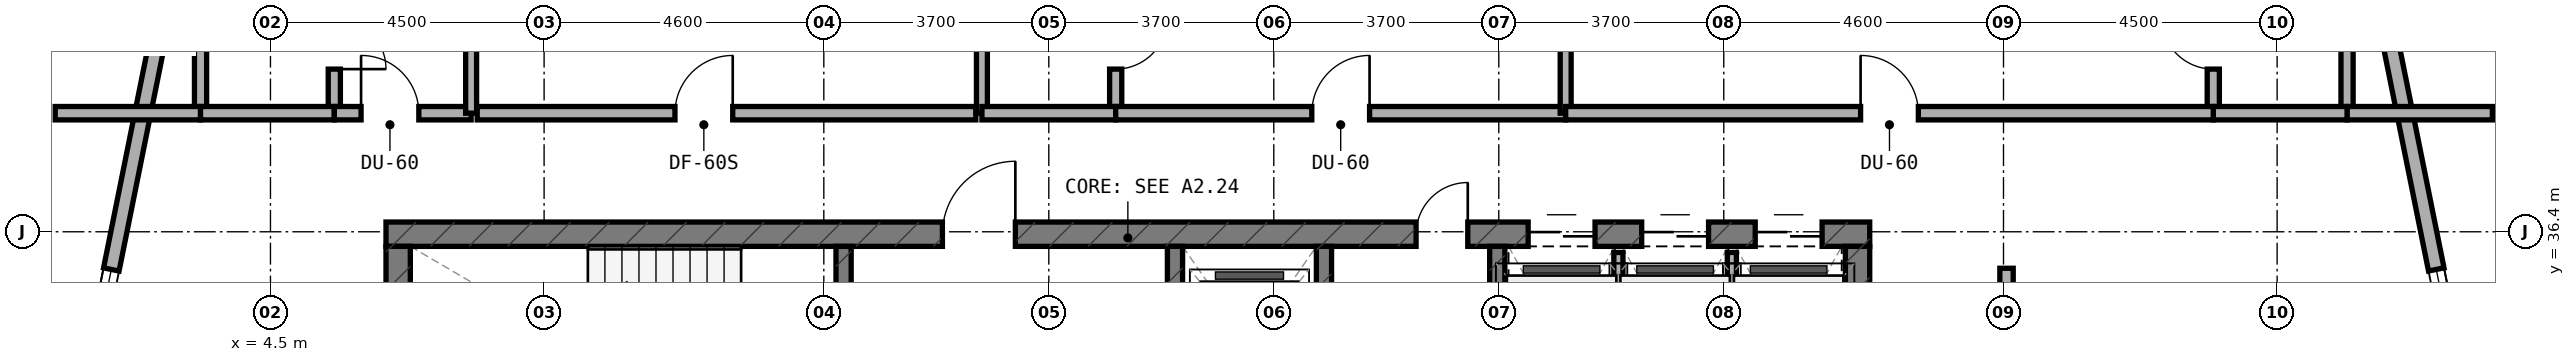
"""IFC4 building model, lengths in metres.
Left out: names, types, materials, properties, quantities, classifications, styles, units other than length and angle.
Written with IfcOpenShell. Run it as: python <this file> out.ifc"""

import sys

from ifc_helpers import new_model, si_unit, direction, frame, frame_2d, origin, place, context, subcontext, project, spatial, rectangle, extrude, element, fill, save


model = new_model("IFC4")
c1 = context("Model", 3, precision=1e-05, world=origin(), true_north=direction((0.0, 1.0)))
c2 = subcontext(c1, "Body", "Model", "MODEL_VIEW")
j1 = project(units=[si_unit("LENGTHUNIT", "METRE"), si_unit("PLANEANGLEUNIT", "RADIAN")], contexts=[c1])
p1 = place(None, origin())
s1 = spatial("IfcSite", under=j1, at=p1, CompositionType="ELEMENT")
p2 = place(p1, origin())
s2 = spatial("IfcBuilding", under=s1, at=p2, CompositionType="ELEMENT")
p3 = place(p2, frame((0.0, 0.0, 109.0)))
s3 = spatial("IfcBuildingStorey", under=s2, at=p3, CompositionType="ELEMENT", Elevation=109.0)
p4 = place(p3, frame((6.4, 36.36, 0.0), z_axis=(0.0, 0.0, 1.0), x_axis=(1.0, 0.0, 0.0)))
e1 = element("IfcWall", 1, at=p4, inside=s3, PredefinedType="SHEAR", context=c2, shape_type="SweptSolid", body=[
    extrude(rectangle(XDim=24.4, YDim=0.4, at=frame_2d((12.2, 0.0))), origin(), (0.0, 0.0, 1.0), 3.5),
])
p5 = place(p4, frame((9.15, 0.0, 0.0)))
e2 = element("IfcOpeningElement", 2, at=p5, cuts=e1, PredefinedType="OPENING", context=c2, shape_type="SweptSolid", body=[
    extrude(rectangle(XDim=1.2, YDim=2.15, at=frame_2d((0.6, 1.075))), frame((0.0, 0.21, 0.0), z_axis=(0.0, -1.0, 0.0), x_axis=(1.0, 0.0, 0.0)), (0.0, 0.0, 1.0), 0.42),
])
p6 = place(p4, frame((16.94, 0.0, 0.0)))
e3 = element("IfcOpeningElement", 3, at=p6, cuts=e1, PredefinedType="OPENING", context=c2, shape_type="SweptSolid", body=[
    extrude(rectangle(XDim=0.85, YDim=2.1, at=frame_2d((0.425, 1.05))), frame((0.0, 0.21, 0.0), z_axis=(0.0, -1.0, 0.0), x_axis=(1.0, 0.0, 0.0)), (0.0, 0.0, 1.0), 0.42),
])
p7 = place(p4, frame((18.783, 0.0, 0.0)))
e4 = element("IfcOpeningElement", 4, at=p7, cuts=e1, PredefinedType="OPENING", context=c2, shape_type="SweptSolid", body=[
    extrude(rectangle(XDim=1.1, YDim=2.15, at=frame_2d((0.55, 1.075))), frame((0.0, 0.21, 0.0), z_axis=(0.0, -1.0, 0.0), x_axis=(1.0, 0.0, 0.0)), (0.0, 0.0, 1.0), 0.42),
])
p8 = place(p4, frame((20.65, 0.0, 0.0)))
e5 = element("IfcOpeningElement", 5, at=p8, cuts=e1, PredefinedType="OPENING", context=c2, shape_type="SweptSolid", body=[
    extrude(rectangle(XDim=1.1, YDim=2.15, at=frame_2d((0.55, 1.075))), frame((0.0, 0.21, 0.0), z_axis=(0.0, -1.0, 0.0), x_axis=(1.0, 0.0, 0.0)), (0.0, 0.0, 1.0), 0.42),
])
p9 = place(p4, frame((22.517, 0.0, 0.0)))
e6 = element("IfcOpeningElement", 6, at=p9, cuts=e1, PredefinedType="OPENING", context=c2, shape_type="SweptSolid", body=[
    extrude(rectangle(XDim=1.1, YDim=2.15, at=frame_2d((0.55, 1.075))), frame((0.0, 0.21, 0.0), z_axis=(0.0, -1.0, 0.0), x_axis=(1.0, 0.0, 0.0)), (0.0, 0.0, 1.0), 0.42),
])
for number, where, z_axis, x_axis in (
    (7, (6.6, 33.0, 0.0), (0.0, 0.0, 1.0), (0.0, 1.0, 0.0)),
    (8, (30.6, 33.0, 0.0), (0.0, 0.0, 1.0), (0.0, 1.0, 0.0)),
):
    element("IfcWall", number, at=place(p3, frame(where, z_axis=z_axis, x_axis=x_axis)), inside=s3, PredefinedType="SHEAR", context=c2, shape_type="SweptSolid", body=[
        extrude(rectangle(XDim=3.16, YDim=0.4, at=frame_2d((1.58, 0.0))), origin(), (0.0, 0.0, 1.0), 3.5),
    ])
p10 = place(p3, frame((13.925, 33.0, 0.0), z_axis=(0.0, 0.0, 1.0), x_axis=(0.0, 1.0, 0.0)))
e9 = element("IfcWall", 9, at=p10, inside=s3, PredefinedType="STANDARD", context=c2, shape_type="SweptSolid", body=[
    extrude(rectangle(XDim=3.16, YDim=0.25, at=frame_2d((1.58, 0.0))), origin(), (0.0, 0.0, 1.0), 3.22),
])
p11 = place(p10, frame((0.98, 0.0, 0.0)))
e10 = element("IfcOpeningElement", 10, at=p11, cuts=e9, PredefinedType="OPENING", context=c2, shape_type="SweptSolid", body=[
    extrude(rectangle(XDim=1.1, YDim=2.15, at=frame_2d((0.55, 1.075))), frame((0.0, 0.135, 0.0), z_axis=(0.0, -1.0, 0.0), x_axis=(1.0, 0.0, 0.0)), (0.0, 0.0, 1.0), 0.27),
])
p12 = place(p3, frame((19.375, 33.0, 0.0), z_axis=(0.0, 0.0, 1.0), x_axis=(0.0, 1.0, 0.0)))
e11 = element("IfcWall", 11, at=p12, inside=s3, PredefinedType="STANDARD", context=c2, shape_type="SweptSolid", body=[
    extrude(rectangle(XDim=3.16, YDim=0.25, at=frame_2d((1.58, 0.0))), origin(), (0.0, 0.0, 1.0), 3.22),
])
p13 = place(p12, frame((0.98, 0.0, 0.0)))
e12 = element("IfcOpeningElement", 12, at=p13, cuts=e11, PredefinedType="OPENING", context=c2, shape_type="SweptSolid", body=[
    extrude(rectangle(XDim=1.1, YDim=2.15, at=frame_2d((0.55, 1.075))), frame((0.0, 0.135, 0.0), z_axis=(0.0, -1.0, 0.0), x_axis=(1.0, 0.0, 0.0)), (0.0, 0.0, 1.0), 0.27),
])
for number, where, z_axis, x_axis in (
    (13, (21.825, 33.0, 0.0), (0.0, 0.0, 1.0), (0.0, 1.0, 0.0)),
    (14, (24.675, 33.0, 0.0), (0.0, 0.0, 1.0), (0.0, 1.0, 0.0)),
):
    element("IfcWall", number, at=place(p3, frame(where, z_axis=z_axis, x_axis=x_axis)), inside=s3, PredefinedType="STANDARD", context=c2, shape_type="SweptSolid", body=[
        extrude(rectangle(XDim=3.16, YDim=0.25, at=frame_2d((1.58, 0.0))), origin(), (0.0, 0.0, 1.0), 3.22),
    ])
p14 = place(p3, frame((41.084, 30.98, 0.0), z_axis=(0.0, 0.0, 1.0), x_axis=(-0.197435082048, 0.980315963543, 0.0)))
e15 = element("IfcWall", 15, at=p14, inside=s3, PredefinedType="STANDARD", context=c2, shape_type="SweptSolid", body=[
    extrude(rectangle(XDim=9.183, YDim=0.26, at=frame_2d((4.591, 0.0))), origin(), (0.0, 0.0, 1.0), 3.22),
])
p15 = place(p14, frame((2.497, 0.0, 0.8)))
e16 = element("IfcOpeningElement", 16, at=p15, cuts=e15, PredefinedType="OPENING", context=c2, shape_type="SweptSolid", body=[
    extrude(rectangle(XDim=2.4, YDim=1.6, at=frame_2d((1.2, 0.8))), frame((0.0, 0.14, 0.0), z_axis=(0.0, -1.0, 0.0), x_axis=(1.0, 0.0, 0.0)), (0.0, 0.0, 1.0), 0.28),
])
p16 = place(p3, frame((2.729, 39.982, 0.0), z_axis=(0.0, 0.0, 1.0), x_axis=(-0.197435082048, -0.980315963543, 0.0)))
e17 = element("IfcWall", 17, at=p16, inside=s3, PredefinedType="STANDARD", context=c2, shape_type="SweptSolid", body=[
    extrude(rectangle(XDim=9.183, YDim=0.26, at=frame_2d((4.591, 0.0))), origin(), (0.0, 0.0, 1.0), 3.22),
])
p17 = place(p16, frame((4.286, 0.0, 0.8)))
e18 = element("IfcOpeningElement", 18, at=p17, cuts=e17, PredefinedType="OPENING", context=c2, shape_type="SweptSolid", body=[
    extrude(rectangle(XDim=2.4, YDim=1.6, at=frame_2d((1.2, 0.8))), frame((0.0, 0.14, 0.0), z_axis=(0.0, -1.0, 0.0), x_axis=(1.0, 0.0, 0.0)), (0.0, 0.0, 1.0), 0.28),
])
p18 = place(p3, frame((26.667, 33.1, 0.0), z_axis=(0.0, 0.0, 1.0), x_axis=(0.0, 1.0, 0.0)))
e19 = element("IfcWall", 19, at=p18, inside=s3, PredefinedType="PARTITIONING", context=c2, shape_type="SweptSolid", body=[
    extrude(rectangle(XDim=2.96, YDim=0.15, at=frame_2d((1.48, 0.0))), origin(), (0.0, 0.0, 1.0), 3.22),
])
p19 = place(p3, frame((28.533, 33.1, 0.0), z_axis=(0.0, 0.0, 1.0), x_axis=(0.0, 1.0, 0.0)))
e20 = element("IfcWall", 20, at=p19, inside=s3, PredefinedType="PARTITIONING", context=c2, shape_type="SweptSolid", body=[
    extrude(rectangle(XDim=2.96, YDim=0.15, at=frame_2d((1.48, 0.0))), origin(), (0.0, 0.0, 1.0), 2.595),
])
p20 = place(p3, frame((5.55, 38.45, 0.0), z_axis=(0.0, 0.0, 1.0), x_axis=(0.0, 1.0, 0.0)))
e21 = element("IfcWall", 21, at=p20, inside=s3, PredefinedType="PLUMBINGWALL", context=c2, shape_type="SweptSolid", body=[
    extrude(rectangle(XDim=2.1, YDim=0.2, at=frame_2d((1.05, 0.0))), origin(), (0.0, 0.0, 1.0), 3.22),
])
p21 = place(p20, frame((0.625, 0.0, 0.0)))
e22 = element("IfcOpeningElement", 22, at=p21, cuts=e21, PredefinedType="OPENING", context=c2, shape_type="SweptSolid", body=[
    extrude(rectangle(XDim=0.85, YDim=2.1, at=frame_2d((0.425, 1.05))), frame((0.0, 0.11, 0.0), z_axis=(0.0, -1.0, 0.0), x_axis=(1.0, 0.0, 0.0)), (0.0, 0.0, 1.0), 0.22),
])
p22 = place(p3, frame((3.35, 38.45, 0.0), z_axis=(0.0, 0.0, 1.0), x_axis=(0.0, 1.0, 0.0)))
e23 = element("IfcWall", 23, at=p22, inside=s3, PredefinedType="PLUMBINGWALL", context=c2, shape_type="SweptSolid", body=[
    extrude(rectangle(XDim=2.1, YDim=0.2, at=frame_2d((1.05, 0.0))), origin(), (0.0, 0.0, 1.0), 3.22),
])
p23 = place(p3, frame((0.96, 38.35, 0.0), z_axis=(0.0, 0.0, 1.0), x_axis=(1.0, 0.0, 0.0)))
e24 = element("IfcWall", 24, at=p23, inside=s3, PredefinedType="SOLIDWALL", context=c2, shape_type="SweptSolid", body=[
    extrude(rectangle(XDim=2.39, YDim=0.22, at=frame_2d((1.195, 0.0))), origin(), (0.0, 0.0, 1.0), 3.22),
])
p24 = place(p3, frame((3.35, 38.35, 0.0), z_axis=(0.0, 0.0, 1.0), x_axis=(1.0, 0.0, 0.0)))
e25 = element("IfcWall", 25, at=p24, inside=s3, PredefinedType="SOLIDWALL", context=c2, shape_type="SweptSolid", body=[
    extrude(rectangle(XDim=2.2, YDim=0.22, at=frame_2d((1.1, 0.0))), origin(), (0.0, 0.0, 1.0), 3.22),
])
p25 = place(p3, frame((5.55, 38.35, 0.0), z_axis=(0.0, 0.0, 1.0), x_axis=(1.0, 0.0, 0.0)))
e26 = element("IfcWall", 26, at=p25, inside=s3, PredefinedType="SOLIDWALL", context=c2, shape_type="SweptSolid", body=[
    extrude(rectangle(XDim=2.25, YDim=0.22, at=frame_2d((1.125, 0.0))), origin(), (0.0, 0.0, 1.0), 2.595),
])
p26 = place(p25, frame((0.44, 0.0, 0.0)))
e27 = element("IfcOpeningElement", 27, at=p26, cuts=e26, PredefinedType="OPENING", context=c2, shape_type="SweptSolid", body=[
    extrude(rectangle(XDim=0.95, YDim=2.1, at=frame_2d((0.475, 1.05))), frame((0.0, 0.12, 0.0), z_axis=(0.0, -1.0, 0.0), x_axis=(1.0, 0.0, 0.0)), (0.0, 0.0, 1.0), 0.24),
])
p27 = place(p3, frame((7.8, 38.35, 0.0), z_axis=(0.0, 0.0, 1.0), x_axis=(0.0, 1.0, 0.0)))
e28 = element("IfcWall", 28, at=p27, inside=s3, PredefinedType="SOLIDWALL", context=c2, shape_type="SweptSolid", body=[
    extrude(rectangle(XDim=5.351, YDim=0.18, at=frame_2d((2.675, 0.0))), origin(), (0.0, 0.0, 1.0), 2.595),
])
p28 = place(p3, frame((7.9, 38.35, 0.0), z_axis=(0.0, 0.0, 1.0), x_axis=(1.0, 0.0, 0.0)))
e29 = element("IfcWall", 29, at=p28, inside=s3, PredefinedType="SOLIDWALL", context=c2, shape_type="SweptSolid", body=[
    extrude(rectangle(XDim=8.2, YDim=0.22, at=frame_2d((4.1, 0.0))), origin(), (0.0, 0.0, 1.0), 3.22),
])
p29 = place(p28, frame((3.252, 0.0, 0.0)))
e30 = element("IfcOpeningElement", 30, at=p29, cuts=e29, PredefinedType="OPENING", context=c2, shape_type="SweptSolid", body=[
    extrude(rectangle(XDim=0.95, YDim=2.1, at=frame_2d((0.475, 1.05))), frame((0.0, 0.12, 0.0), z_axis=(0.0, -1.0, 0.0), x_axis=(1.0, 0.0, 0.0)), (0.0, 0.0, 1.0), 0.24),
])
p30 = place(p3, frame((16.2, 38.35, 0.0), z_axis=(0.0, 0.0, 1.0), x_axis=(0.0, 1.0, 0.0)))
e31 = element("IfcWall", 31, at=p30, inside=s3, PredefinedType="SOLIDWALL", context=c2, shape_type="SweptSolid", body=[
    extrude(rectangle(XDim=6.79, YDim=0.18, at=frame_2d((3.395, 0.0))), origin(), (0.0, 0.0, 1.0), 2.595),
])
p31 = place(p3, frame((18.4, 38.45, 0.0), z_axis=(0.0, 0.0, 1.0), x_axis=(0.0, 1.0, 0.0)))
e32 = element("IfcWall", 32, at=p31, inside=s3, PredefinedType="PLUMBINGWALL", context=c2, shape_type="SweptSolid", body=[
    extrude(rectangle(XDim=2.1, YDim=0.2, at=frame_2d((1.05, 0.0))), origin(), (0.0, 0.0, 1.0), 2.835),
])
p32 = place(p31, frame((0.625, 0.0, 0.0)))
e33 = element("IfcOpeningElement", 33, at=p32, cuts=e32, PredefinedType="OPENING", context=c2, shape_type="SweptSolid", body=[
    extrude(rectangle(XDim=0.85, YDim=2.1, at=frame_2d((0.425, 1.05))), frame((0.0, 0.11, 0.0), z_axis=(0.0, -1.0, 0.0), x_axis=(1.0, 0.0, 0.0)), (0.0, 0.0, 1.0), 0.22),
])
p33 = place(p3, frame((16.2, 38.35, 0.0), z_axis=(0.0, 0.0, 1.0), x_axis=(1.0, 0.0, 0.0)))
e34 = element("IfcWall", 34, at=p33, inside=s3, PredefinedType="SOLIDWALL", context=c2, shape_type="SweptSolid", body=[
    extrude(rectangle(XDim=2.2, YDim=0.22, at=frame_2d((1.1, 0.0))), origin(), (0.0, 0.0, 1.0), 2.595),
])
p34 = place(p3, frame((18.4, 38.35, 0.0), z_axis=(0.0, 0.0, 1.0), x_axis=(1.0, 0.0, 0.0)))
e35 = element("IfcWall", 35, at=p34, inside=s3, PredefinedType="SOLIDWALL", context=c2, shape_type="SweptSolid", body=[
    extrude(rectangle(XDim=7.4, YDim=0.22, at=frame_2d((3.7, 0.0))), origin(), (0.0, 0.0, 1.0), 2.595),
])
p35 = place(p34, frame((3.225, 0.0, 0.0)))
e36 = element("IfcOpeningElement", 36, at=p35, cuts=e35, PredefinedType="OPENING", context=c2, shape_type="SweptSolid", body=[
    extrude(rectangle(XDim=0.95, YDim=2.1, at=frame_2d((0.475, 1.05))), frame((0.0, 0.12, 0.0), z_axis=(0.0, -1.0, 0.0), x_axis=(1.0, 0.0, 0.0)), (0.0, 0.0, 1.0), 0.24),
])
p36 = place(p3, frame((25.8, 38.35, 0.0), z_axis=(0.0, 0.0, 1.0), x_axis=(0.0, 1.0, 0.0)))
e37 = element("IfcWall", 37, at=p36, inside=s3, PredefinedType="SOLIDWALL", context=c2, shape_type="SweptSolid", body=[
    extrude(rectangle(XDim=6.79, YDim=0.18, at=frame_2d((3.395, 0.0))), origin(), (0.0, 0.0, 1.0), 2.595),
])
p37 = place(p3, frame((36.45, 38.45, 0.0), z_axis=(0.0, 0.0, 1.0), x_axis=(0.0, 1.0, 0.0)))
e38 = element("IfcWall", 38, at=p37, inside=s3, PredefinedType="PLUMBINGWALL", context=c2, shape_type="SweptSolid", body=[
    extrude(rectangle(XDim=2.1, YDim=0.2, at=frame_2d((1.05, 0.0))), origin(), (0.0, 0.0, 1.0), 3.22),
])
p38 = place(p37, frame((0.625, 0.0, 0.0)))
e39 = element("IfcOpeningElement", 39, at=p38, cuts=e38, PredefinedType="OPENING", context=c2, shape_type="SweptSolid", body=[
    extrude(rectangle(XDim=0.85, YDim=2.1, at=frame_2d((0.425, 1.05))), frame((0.0, 0.11, 0.0), z_axis=(0.0, -1.0, 0.0), x_axis=(1.0, 0.0, 0.0)), (0.0, 0.0, 1.0), 0.22),
])
p39 = place(p3, frame((38.65, 38.45, 0.0), z_axis=(0.0, 0.0, 1.0), x_axis=(0.0, 1.0, 0.0)))
e40 = element("IfcWall", 40, at=p39, inside=s3, PredefinedType="PLUMBINGWALL", context=c2, shape_type="SweptSolid", body=[
    extrude(rectangle(XDim=2.1, YDim=0.2, at=frame_2d((1.05, 0.0))), origin(), (0.0, 0.0, 1.0), 3.22),
])
p40 = place(p3, frame((38.65, 38.35, 0.0), z_axis=(0.0, 0.0, 1.0), x_axis=(1.0, 0.0, 0.0)))
e41 = element("IfcWall", 41, at=p40, inside=s3, PredefinedType="SOLIDWALL", context=c2, shape_type="SweptSolid", body=[
    extrude(rectangle(XDim=2.39, YDim=0.22, at=frame_2d((1.195, 0.0))), origin(), (0.0, 0.0, 1.0), 3.22),
])
p41 = place(p3, frame((36.45, 38.35, 0.0), z_axis=(0.0, 0.0, 1.0), x_axis=(1.0, 0.0, 0.0)))
e42 = element("IfcWall", 42, at=p41, inside=s3, PredefinedType="SOLIDWALL", context=c2, shape_type="SweptSolid", body=[
    extrude(rectangle(XDim=2.2, YDim=0.22, at=frame_2d((1.1, 0.0))), origin(), (0.0, 0.0, 1.0), 3.22),
])
p42 = place(p3, frame((25.8, 38.35, 0.0), z_axis=(0.0, 0.0, 1.0), x_axis=(1.0, 0.0, 0.0)))
e43 = element("IfcWall", 43, at=p42, inside=s3, PredefinedType="SOLIDWALL", context=c2, shape_type="SweptSolid", body=[
    extrude(rectangle(XDim=10.65, YDim=0.22, at=frame_2d((5.325, 0.0))), origin(), (0.0, 0.0, 1.0), 2.595),
])
p43 = place(p42, frame((4.85, 0.0, 0.0)))
e44 = element("IfcOpeningElement", 44, at=p43, cuts=e43, PredefinedType="OPENING", context=c2, shape_type="SweptSolid", body=[
    extrude(rectangle(XDim=0.95, YDim=2.1, at=frame_2d((0.475, 1.05))), frame((0.0, 0.12, 0.0), z_axis=(0.0, -1.0, 0.0), x_axis=(1.0, 0.0, 0.0)), (0.0, 0.0, 1.0), 0.24),
])
p44 = place(p3, frame((33.05, 31.088, 0.0), z_axis=(0.0, 0.0, 1.0), x_axis=(0.0, 1.0, 0.0)))
e45 = element("IfcWall", 45, at=p44, inside=s3, PredefinedType="SOLIDWALL", context=c2, shape_type="SweptSolid", body=[
    extrude(rectangle(XDim=4.712, YDim=0.22, at=frame_2d((2.356, 0.0))), origin(), (0.0, 0.0, 1.0), 2.595),
])
p45 = place(p44, frame((1.881, 0.0, 0.0)))
e46 = element("IfcOpeningElement", 46, at=p45, cuts=e45, PredefinedType="OPENING", context=c2, shape_type="SweptSolid", body=[
    extrude(rectangle(XDim=0.95, YDim=2.1, at=frame_2d((0.475, 1.05))), frame((0.0, 0.12, 0.0), z_axis=(0.0, -1.0, 0.0), x_axis=(1.0, 0.0, 0.0)), (0.0, 0.0, 1.0), 0.24),
])
p46 = place(p15, origin())
e47 = element("IfcWindow", 47, at=p46, inside=s3, PartitioningType="SINGLE_PANEL", PredefinedType="WINDOW", context=c2, shape_type="SweptSolid", body=[
    extrude(rectangle(XDim=2.4, YDim=1.6, at=frame_2d((1.2, 0.8))), frame((0.0, 0.03, 0.0), z_axis=(0.0, -1.0, 0.0), x_axis=(1.0, 0.0, 0.0)), (0.0, 0.0, 1.0), 0.06),
])
fill(e16, e47)
p47 = place(p17, origin())
e48 = element("IfcWindow", 48, at=p47, inside=s3, PartitioningType="SINGLE_PANEL", PredefinedType="WINDOW", context=c2, shape_type="SweptSolid", body=[
    extrude(rectangle(XDim=2.4, YDim=1.6, at=frame_2d((1.2, 0.8))), frame((0.0, 0.03, 0.0), z_axis=(0.0, -1.0, 0.0), x_axis=(1.0, 0.0, 0.0)), (0.0, 0.0, 1.0), 0.06),
])
fill(e18, e48)
p48 = place(p5, origin())
e49 = element("IfcDoor", 49, at=p48, inside=s3, OperationType="SINGLE_SWING_RIGHT", PredefinedType="DOOR", context=c2, shape_type="SweptSolid", body=[
    extrude(rectangle(XDim=1.2, YDim=2.15, at=frame_2d((0.6, 1.075))), frame((0.0, 0.025, 0.0), z_axis=(0.0, -1.0, 0.0), x_axis=(1.0, 0.0, 0.0)), (0.0, 0.0, 1.0), 0.05),
])
fill(e2, e49)
p49 = place(p6, origin())
e50 = element("IfcDoor", 50, at=p49, inside=s3, OperationType="SINGLE_SWING_RIGHT", PredefinedType="DOOR", context=c2, shape_type="SweptSolid", body=[
    extrude(rectangle(XDim=0.85, YDim=2.1, at=frame_2d((0.425, 1.05))), frame((0.0, 0.025, 0.0), z_axis=(0.0, -1.0, 0.0), x_axis=(1.0, 0.0, 0.0)), (0.0, 0.0, 1.0), 0.05),
])
fill(e3, e50)
p50 = place(p7, origin())
e51 = element("IfcDoor", 51, at=p50, inside=s3, OperationType="DOUBLE_DOOR_SLIDING", PredefinedType="DOOR", context=c2, shape_type="SweptSolid", body=[
    extrude(rectangle(XDim=1.1, YDim=2.15, at=frame_2d((0.55, 1.075))), frame((0.0, 0.025, 0.0), z_axis=(0.0, -1.0, 0.0), x_axis=(1.0, 0.0, 0.0)), (0.0, 0.0, 1.0), 0.05),
])
fill(e4, e51)
p51 = place(p8, origin())
e52 = element("IfcDoor", 52, at=p51, inside=s3, OperationType="DOUBLE_DOOR_SLIDING", PredefinedType="DOOR", context=c2, shape_type="SweptSolid", body=[
    extrude(rectangle(XDim=1.1, YDim=2.15, at=frame_2d((0.55, 1.075))), frame((0.0, 0.025, 0.0), z_axis=(0.0, -1.0, 0.0), x_axis=(1.0, 0.0, 0.0)), (0.0, 0.0, 1.0), 0.05),
])
fill(e5, e52)
p52 = place(p9, origin())
e53 = element("IfcDoor", 53, at=p52, inside=s3, OperationType="DOUBLE_DOOR_SLIDING", PredefinedType="DOOR", context=c2, shape_type="SweptSolid", body=[
    extrude(rectangle(XDim=1.1, YDim=2.15, at=frame_2d((0.55, 1.075))), frame((0.0, 0.025, 0.0), z_axis=(0.0, -1.0, 0.0), x_axis=(1.0, 0.0, 0.0)), (0.0, 0.0, 1.0), 0.05),
])
fill(e6, e53)
p53 = place(p21, frame((0.85, 0.0, 0.0), z_axis=(0.0, 0.0, 1.0), x_axis=(-1.0, 0.0, 0.0)))
e54 = element("IfcDoor", 54, at=p53, inside=s3, OperationType="SINGLE_SWING_RIGHT", PredefinedType="DOOR", context=c2, shape_type="SweptSolid", body=[
    extrude(rectangle(XDim=0.85, YDim=2.1, at=frame_2d((0.425, 1.05))), frame((0.0, 0.025, 0.0), z_axis=(0.0, -1.0, 0.0), x_axis=(1.0, 0.0, 0.0)), (0.0, 0.0, 1.0), 0.05),
])
fill(e22, e54)
p54 = place(p26, origin())
e55 = element("IfcDoor", 55, at=p54, inside=s3, OperationType="SINGLE_SWING_LEFT", PredefinedType="DOOR", context=c2, shape_type="SweptSolid", body=[
    extrude(rectangle(XDim=0.95, YDim=2.1, at=frame_2d((0.475, 1.05))), frame((0.0, 0.025, 0.0), z_axis=(0.0, -1.0, 0.0), x_axis=(1.0, 0.0, 0.0)), (0.0, 0.0, 1.0), 0.05),
])
fill(e27, e55)
p55 = place(p29, origin())
e56 = element("IfcDoor", 56, at=p55, inside=s3, OperationType="SINGLE_SWING_RIGHT", PredefinedType="DOOR", context=c2, shape_type="SweptSolid", body=[
    extrude(rectangle(XDim=0.95, YDim=2.1, at=frame_2d((0.475, 1.05))), frame((0.0, 0.025, 0.0), z_axis=(0.0, -1.0, 0.0), x_axis=(1.0, 0.0, 0.0)), (0.0, 0.0, 1.0), 0.05),
])
fill(e30, e56)
p56 = place(p32, frame((0.85, 0.0, 0.0), z_axis=(0.0, 0.0, 1.0), x_axis=(-1.0, 0.0, 0.0)))
e57 = element("IfcDoor", 57, at=p56, inside=s3, OperationType="SINGLE_SWING_LEFT", PredefinedType="DOOR", context=c2, shape_type="SweptSolid", body=[
    extrude(rectangle(XDim=0.85, YDim=2.1, at=frame_2d((0.425, 1.05))), frame((0.0, 0.025, 0.0), z_axis=(0.0, -1.0, 0.0), x_axis=(1.0, 0.0, 0.0)), (0.0, 0.0, 1.0), 0.05),
])
fill(e33, e57)
p57 = place(p35, origin())
e58 = element("IfcDoor", 58, at=p57, inside=s3, OperationType="SINGLE_SWING_RIGHT", PredefinedType="DOOR", context=c2, shape_type="SweptSolid", body=[
    extrude(rectangle(XDim=0.95, YDim=2.1, at=frame_2d((0.475, 1.05))), frame((0.0, 0.025, 0.0), z_axis=(0.0, -1.0, 0.0), x_axis=(1.0, 0.0, 0.0)), (0.0, 0.0, 1.0), 0.05),
])
fill(e36, e58)
p58 = place(p38, origin())
e59 = element("IfcDoor", 59, at=p58, inside=s3, OperationType="SINGLE_SWING_RIGHT", PredefinedType="DOOR", context=c2, shape_type="SweptSolid", body=[
    extrude(rectangle(XDim=0.85, YDim=2.1, at=frame_2d((0.425, 1.05))), frame((0.0, 0.025, 0.0), z_axis=(0.0, -1.0, 0.0), x_axis=(1.0, 0.0, 0.0)), (0.0, 0.0, 1.0), 0.05),
])
fill(e39, e59)
p59 = place(p43, origin())
e60 = element("IfcDoor", 60, at=p59, inside=s3, OperationType="SINGLE_SWING_LEFT", PredefinedType="DOOR", context=c2, shape_type="SweptSolid", body=[
    extrude(rectangle(XDim=0.95, YDim=2.1, at=frame_2d((0.475, 1.05))), frame((0.0, 0.025, 0.0), z_axis=(0.0, -1.0, 0.0), x_axis=(1.0, 0.0, 0.0)), (0.0, 0.0, 1.0), 0.05),
])
fill(e44, e60)
save(model, sys.argv[1])
